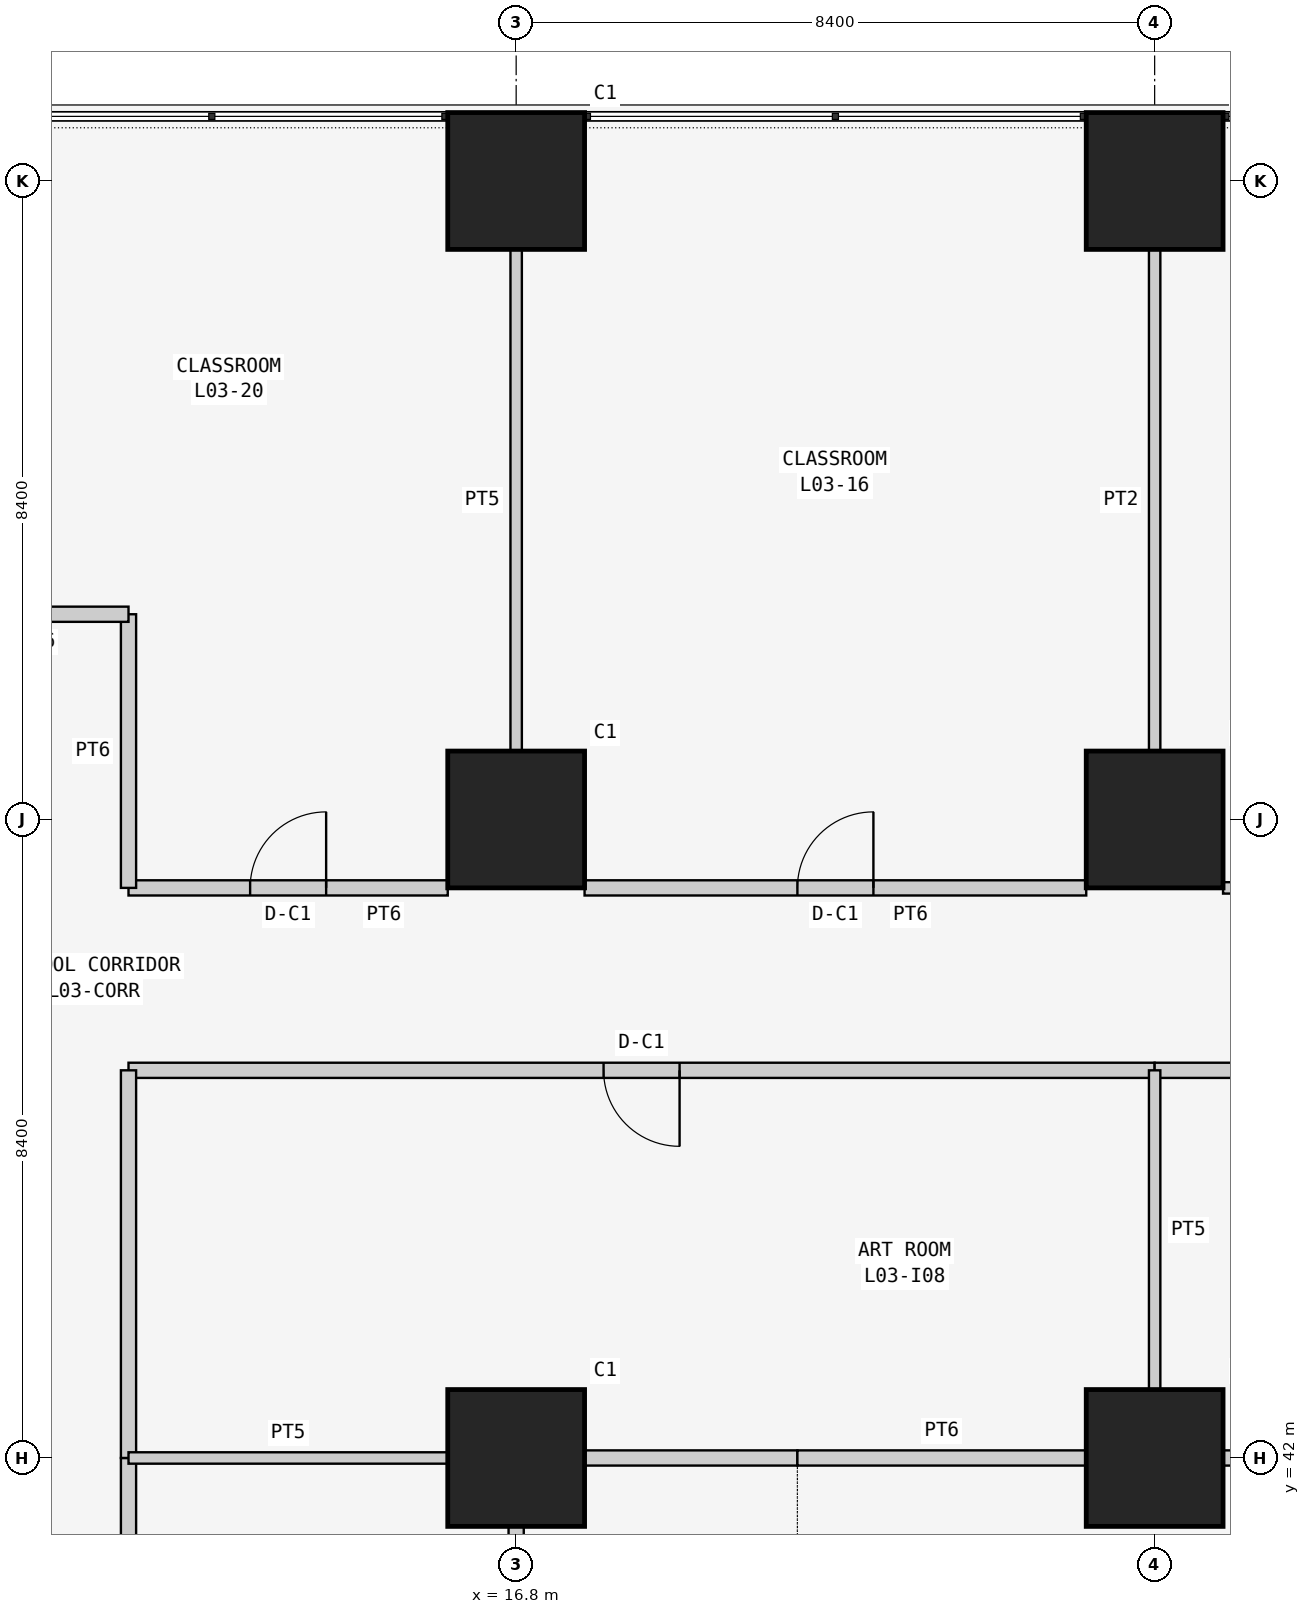
"""IFC4 building model, lengths in metres.
Left out: names, types, materials, properties, quantities, classifications, styles, units other than length and angle.
Written with IfcOpenShell. Run it as: python <this file> out.ifc"""

import sys

from ifc_helpers import new_model, si_unit, direction, frame, frame_2d, origin, origin_2d, place, context, subcontext, project, spatial, rectangle, extrude, element, fill, save


model = new_model("IFC4")
c1 = context("Model", 3, precision=1e-05, world=origin(), true_north=direction((0.0, 1.0)))
c2 = subcontext(c1, "Body", "Model", "MODEL_VIEW")
j1 = project(units=[si_unit("LENGTHUNIT", "METRE"), si_unit("PLANEANGLEUNIT", "RADIAN")], contexts=[c1])
p1 = place(None, origin())
s1 = spatial("IfcSite", under=j1, at=p1, CompositionType="ELEMENT")
p2 = place(p1, origin())
s2 = spatial("IfcBuilding", under=s1, at=p2, CompositionType="ELEMENT")
p3 = place(p2, frame((0.0, 0.0, 15.0)))
s3 = spatial("IfcBuildingStorey", under=s2, at=p3, CompositionType="ELEMENT", Elevation=15.0)
for number, where, z_axis, x_axis in (
    (1, (16.8, 42.0, 0.0), (0.0, 0.0, 1.0), (1.0, 0.0, 0.0)),
    (2, (16.8, 50.4, 0.0), (0.0, 0.0, 1.0), (1.0, 0.0, 0.0)),
    (3, (16.8, 58.8, 0.0), (0.0, 0.0, 1.0), (1.0, 0.0, 0.0)),
    (4, (25.2, 42.0, 0.0), (0.0, 0.0, 1.0), (1.0, 0.0, 0.0)),
    (5, (25.2, 50.4, 0.0), (0.0, 0.0, 1.0), (1.0, 0.0, 0.0)),
    (6, (25.2, 58.8, 0.0), (0.0, 0.0, 1.0), (1.0, 0.0, 0.0)),
):
    element("IfcColumn", number, at=place(p3, frame(where, z_axis=z_axis, x_axis=x_axis)), inside=s3, PredefinedType="COLUMN", context=c2, shape_type="SweptSolid", body=[
        extrude(rectangle(XDim=1.8, YDim=1.8, at=origin_2d()), origin(), (0.0, 0.0, 1.0), 4.5),
    ])
p4 = place(p3, frame((25.2, 51.3, 0.0), z_axis=(0.0, 0.0, 1.0), x_axis=(0.0, 1.0, 0.0)))
e7 = element("IfcWall", 7, at=p4, inside=s3, PredefinedType="PARTITIONING", context=c2, shape_type="SweptSolid", body=[
    extrude(rectangle(XDim=6.6, YDim=0.15, at=frame_2d((3.3, 0.0))), origin(), (0.0, 0.0, 1.0), 3.543),
])
p5 = place(p3, frame((28.3, 49.5, 0.0), z_axis=(0.0, 0.0, 1.0), x_axis=(-1.0, 0.0, 0.0)))
e8 = element("IfcWall", 8, at=p5, inside=s3, PredefinedType="PARTITIONING", context=c2, shape_type="SweptSolid", body=[
    extrude(rectangle(XDim=2.2, YDim=0.15, at=frame_2d((1.1, 0.0))), origin(), (0.0, 0.0, 1.0), 4.3),
])
p6 = place(p5, frame((0.65, 0.0, 0.0)))
e9 = element("IfcOpeningElement", 9, at=p6, cuts=e8, PredefinedType="OPENING", context=c2, shape_type="SweptSolid", body=[
    extrude(rectangle(XDim=0.9, YDim=2.1, at=frame_2d((0.45, 1.05))), frame((0.0, 0.085, 0.0), z_axis=(0.0, -1.0, 0.0), x_axis=(1.0, 0.0, 0.0)), (0.0, 0.0, 1.0), 0.17),
])
p7 = place(p3, frame((16.8, 51.3, 0.0), z_axis=(0.0, 0.0, 1.0), x_axis=(0.0, 1.0, 0.0)))
e10 = element("IfcWall", 10, at=p7, inside=s3, PredefinedType="PARTITIONING", context=c2, shape_type="SweptSolid", body=[
    extrude(rectangle(XDim=6.6, YDim=0.15, at=frame_2d((3.3, 0.0))), origin(), (0.0, 0.0, 1.0), 3.543),
])
p8 = place(p3, frame((24.3, 49.5, 0.0), z_axis=(0.0, 0.0, 1.0), x_axis=(-1.0, 0.0, 0.0)))
e11 = element("IfcWall", 11, at=p8, inside=s3, PredefinedType="PARTITIONING", context=c2, shape_type="SweptSolid", body=[
    extrude(rectangle(XDim=6.6, YDim=0.2, at=frame_2d((3.3, 0.0))), origin(), (0.0, 0.0, 1.0), 4.3),
])
p9 = place(p8, frame((2.8, 0.0, 0.0)))
e12 = element("IfcOpeningElement", 12, at=p9, cuts=e11, PredefinedType="OPENING", context=c2, shape_type="SweptSolid", body=[
    extrude(rectangle(XDim=1.0, YDim=2.1, at=frame_2d((0.5, 1.05))), frame((0.0, 0.11, 0.0), z_axis=(0.0, -1.0, 0.0), x_axis=(1.0, 0.0, 0.0)), (0.0, 0.0, 1.0), 0.22),
])
p10 = place(p3, frame((15.9, 49.5, 0.0), z_axis=(0.0, 0.0, 1.0), x_axis=(-1.0, 0.0, 0.0)))
e13 = element("IfcWall", 13, at=p10, inside=s3, PredefinedType="PARTITIONING", context=c2, shape_type="SweptSolid", body=[
    extrude(rectangle(XDim=4.2, YDim=0.2, at=frame_2d((2.1, 0.0))), origin(), (0.0, 0.0, 1.0), 4.3),
])
p11 = place(p10, frame((1.6, 0.0, 0.0)))
e14 = element("IfcOpeningElement", 14, at=p11, cuts=e13, PredefinedType="OPENING", context=c2, shape_type="SweptSolid", body=[
    extrude(rectangle(XDim=1.0, YDim=2.1, at=frame_2d((0.5, 1.05))), frame((0.0, 0.11, 0.0), z_axis=(0.0, -1.0, 0.0), x_axis=(1.0, 0.0, 0.0)), (0.0, 0.0, 1.0), 0.22),
])
p12 = place(p3, frame((11.7, 49.5, 0.0), z_axis=(0.0, 0.0, 1.0), x_axis=(0.0, 1.0, 0.0)))
e15 = element("IfcWall", 15, at=p12, inside=s3, PredefinedType="PARTITIONING", context=c2, shape_type="SweptSolid", body=[
    extrude(rectangle(XDim=3.6, YDim=0.2, at=frame_2d((1.8, 0.0))), origin(), (0.0, 0.0, 1.0), 4.3),
])
p13 = place(p3, frame((11.7, 53.1, 0.0), z_axis=(0.0, 0.0, 1.0), x_axis=(-1.0, 0.0, 0.0)))
e16 = element("IfcWall", 16, at=p13, inside=s3, PredefinedType="PARTITIONING", context=c2, shape_type="SweptSolid", body=[
    extrude(rectangle(XDim=2.4, YDim=0.2, at=frame_2d((1.2, 0.0))), origin(), (0.0, 0.0, 1.0), 4.3),
])
p14 = place(p3, frame((11.7, 42.0, 0.0), z_axis=(0.0, 0.0, 1.0), x_axis=(0.0, -1.0, 0.0)))
e17 = element("IfcWall", 17, at=p14, inside=s3, PredefinedType="PARTITIONING", context=c2, shape_type="SweptSolid", body=[
    extrude(rectangle(XDim=8.4, YDim=0.2, at=frame_2d((4.2, 0.0))), origin(), (0.0, 0.0, 1.0), 4.3),
])
p15 = place(p14, frame((3.7, 0.0, 0.0)))
e18 = element("IfcOpeningElement", 18, at=p15, cuts=e17, PredefinedType="OPENING", context=c2, shape_type="SweptSolid", body=[
    extrude(rectangle(XDim=1.0, YDim=2.1, at=frame_2d((0.5, 1.05))), frame((0.0, 0.11, 0.0), z_axis=(0.0, -1.0, 0.0), x_axis=(1.0, 0.0, 0.0)), (0.0, 0.0, 1.0), 0.22),
])
p16 = place(p3, frame((25.2, 47.1, 0.0), z_axis=(0.0, 0.0, 1.0), x_axis=(-1.0, 0.0, 0.0)))
e19 = element("IfcWall", 19, at=p16, inside=s3, PredefinedType="PARTITIONING", context=c2, shape_type="SweptSolid", body=[
    extrude(rectangle(XDim=13.5, YDim=0.2, at=frame_2d((6.75, 0.0))), origin(), (0.0, 0.0, 1.0), 4.3),
])
p17 = place(p16, frame((6.25, 0.0, 0.0)))
e20 = element("IfcOpeningElement", 20, at=p17, cuts=e19, PredefinedType="OPENING", context=c2, shape_type="SweptSolid", body=[
    extrude(rectangle(XDim=1.0, YDim=2.1, at=frame_2d((0.5, 1.05))), frame((0.0, 0.11, 0.0), z_axis=(0.0, -1.0, 0.0), x_axis=(1.0, 0.0, 0.0)), (0.0, 0.0, 1.0), 0.22),
])
p18 = place(p3, frame((11.7, 47.1, 0.0), z_axis=(0.0, 0.0, 1.0), x_axis=(0.0, -1.0, 0.0)))
e21 = element("IfcWall", 21, at=p18, inside=s3, PredefinedType="PARTITIONING", context=c2, shape_type="SweptSolid", body=[
    extrude(rectangle(XDim=5.1, YDim=0.2, at=frame_2d((2.55, 0.0))), origin(), (0.0, 0.0, 1.0), 4.3),
])
p19 = place(p3, frame((42.0, 47.1, 0.0), z_axis=(0.0, 0.0, 1.0), x_axis=(-1.0, 0.0, 0.0)))
e22 = element("IfcWall", 22, at=p19, inside=s3, PredefinedType="PARTITIONING", context=c2, shape_type="SweptSolid", body=[
    extrude(rectangle(XDim=16.8, YDim=0.2, at=frame_2d((8.4, 0.0))), origin(), (0.0, 0.0, 1.0), 4.3),
])
p20 = place(p19, frame((7.9, 0.0, 0.0)))
e23 = element("IfcOpeningElement", 23, at=p20, cuts=e22, PredefinedType="OPENING", context=c2, shape_type="SweptSolid", body=[
    extrude(rectangle(XDim=1.0, YDim=2.1, at=frame_2d((0.5, 1.05))), frame((0.0, 0.11, 0.0), z_axis=(0.0, -1.0, 0.0), x_axis=(1.0, 0.0, 0.0)), (0.0, 0.0, 1.0), 0.22),
])
p21 = place(p3, frame((16.8, 34.5, 0.0), z_axis=(0.0, 0.0, 1.0), x_axis=(0.0, 1.0, 0.0)))
e24 = element("IfcWall", 24, at=p21, inside=s3, PredefinedType="PARTITIONING", context=c2, shape_type="SweptSolid", body=[
    extrude(rectangle(XDim=6.6, YDim=0.2, at=frame_2d((3.3, 0.0))), origin(), (0.0, 0.0, 1.0), 3.543),
])
p22 = place(p3, frame((17.7, 42.0, 0.0), z_axis=(0.0, 0.0, 1.0), x_axis=(1.0, 0.0, 0.0)))
e25 = element("IfcWall", 25, at=p22, inside=s3, PredefinedType="PARTITIONING", context=c2, shape_type="SweptSolid", body=[
    extrude(rectangle(XDim=2.8, YDim=0.2, at=frame_2d((1.4, 0.0))), origin(), (0.0, 0.0, 1.0), 3.543),
])
p23 = place(p3, frame((20.5, 42.0, 0.0), z_axis=(0.0, 0.0, 1.0), x_axis=(1.0, 0.0, 0.0)))
e26 = element("IfcWall", 26, at=p23, inside=s3, PredefinedType="PARTITIONING", context=c2, shape_type="SweptSolid", body=[
    extrude(rectangle(XDim=3.8, YDim=0.2, at=frame_2d((1.9, 0.0))), origin(), (0.0, 0.0, 1.0), 3.543),
])
p24 = place(p3, frame((26.1, 42.0, 0.0), z_axis=(0.0, 0.0, 1.0), x_axis=(1.0, 0.0, 0.0)))
e27 = element("IfcWall", 27, at=p24, inside=s3, PredefinedType="PARTITIONING", context=c2, shape_type="SweptSolid", body=[
    extrude(rectangle(XDim=6.6, YDim=0.2, at=frame_2d((3.3, 0.0))), origin(), (0.0, 0.0, 1.0), 3.543),
])
p25 = place(p3, frame((11.7, 42.0, 0.0), z_axis=(0.0, 0.0, 1.0), x_axis=(1.0, 0.0, 0.0)))
e28 = element("IfcWall", 28, at=p25, inside=s3, PredefinedType="PARTITIONING", context=c2, shape_type="SweptSolid", body=[
    extrude(rectangle(XDim=4.2, YDim=0.15, at=frame_2d((2.1, 0.0))), origin(), (0.0, 0.0, 1.0), 3.543),
])
p26 = place(p3, frame((25.2, 47.1, 0.0), z_axis=(0.0, 0.0, 1.0), x_axis=(0.0, -1.0, 0.0)))
e29 = element("IfcWall", 29, at=p26, inside=s3, PredefinedType="PARTITIONING", context=c2, shape_type="SweptSolid", body=[
    extrude(rectangle(XDim=4.2, YDim=0.15, at=frame_2d((2.1, 0.0))), origin(), (0.0, 0.0, 1.0), 3.543),
])
p27 = place(p9, frame((1.0, 0.0, 0.0), z_axis=(0.0, 0.0, 1.0), x_axis=(-1.0, 0.0, 0.0)))
e30 = element("IfcDoor", 30, at=p27, inside=s3, OperationType="SINGLE_SWING_RIGHT", PredefinedType="DOOR", context=c2, shape_type="SweptSolid", body=[
    extrude(rectangle(XDim=1.0, YDim=2.1, at=frame_2d((0.5, 1.05))), frame((0.0, 0.025, 0.0), z_axis=(0.0, -1.0, 0.0), x_axis=(1.0, 0.0, 0.0)), (0.0, 0.0, 1.0), 0.05),
])
fill(e12, e30)
p28 = place(p11, frame((1.0, 0.0, 0.0), z_axis=(0.0, 0.0, 1.0), x_axis=(-1.0, 0.0, 0.0)))
e31 = element("IfcDoor", 31, at=p28, inside=s3, OperationType="SINGLE_SWING_RIGHT", PredefinedType="DOOR", context=c2, shape_type="SweptSolid", body=[
    extrude(rectangle(XDim=1.0, YDim=2.1, at=frame_2d((0.5, 1.05))), frame((0.0, 0.025, 0.0), z_axis=(0.0, -1.0, 0.0), x_axis=(1.0, 0.0, 0.0)), (0.0, 0.0, 1.0), 0.05),
])
fill(e14, e31)
p29 = place(p17, origin())
e32 = element("IfcDoor", 32, at=p29, inside=s3, OperationType="SINGLE_SWING_LEFT", PredefinedType="DOOR", context=c2, shape_type="SweptSolid", body=[
    extrude(rectangle(XDim=1.0, YDim=2.1, at=frame_2d((0.5, 1.05))), frame((0.0, 0.025, 0.0), z_axis=(0.0, -1.0, 0.0), x_axis=(1.0, 0.0, 0.0)), (0.0, 0.0, 1.0), 0.05),
])
fill(e20, e32)
save(model, sys.argv[1])
